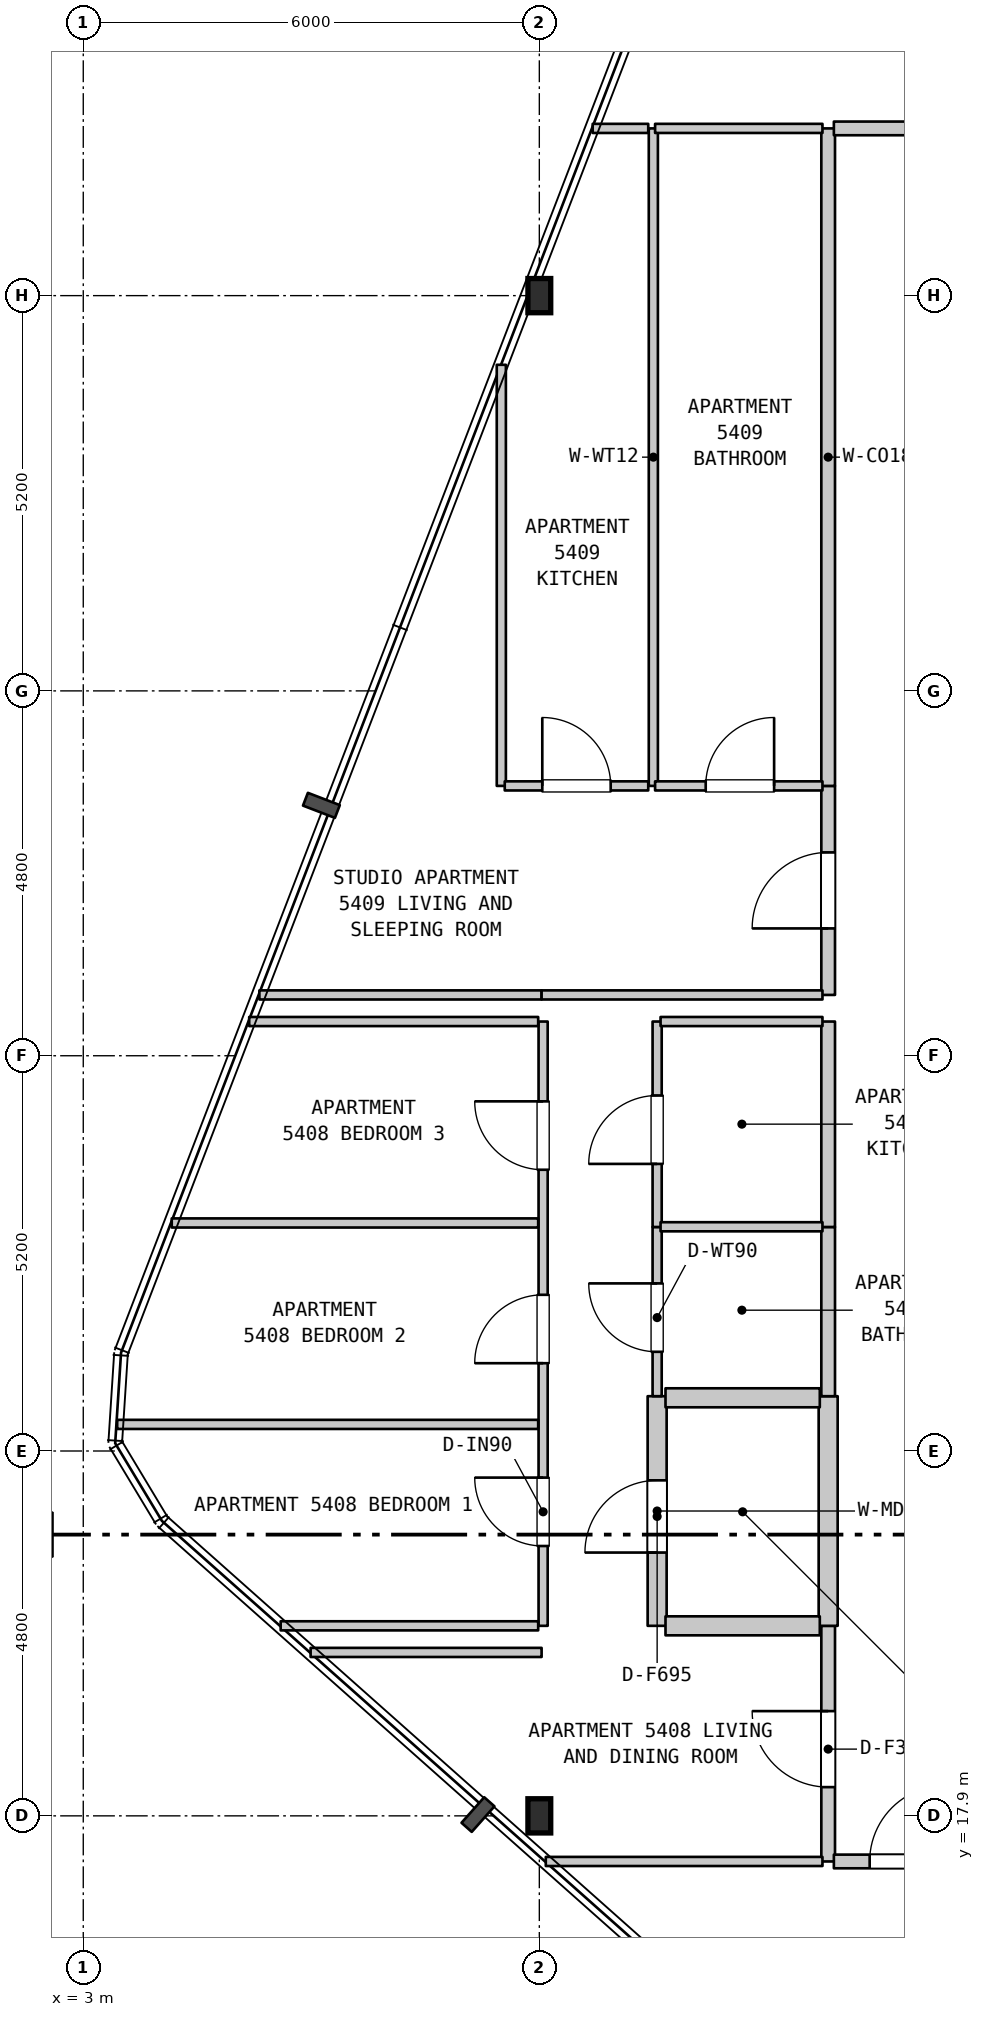
"""IFC4 building model, lengths in metres.
Left out: names, types, materials, properties, quantities, classifications, styles, units other than length and angle.
Written with IfcOpenShell. Run it as: python <this file> out.ifc"""

import sys

from ifc_helpers import new_model, si_unit, direction, frame, frame_2d, origin, origin_2d, place, context, subcontext, project, spatial, rectangle, i_section, extrude, element, fill, save


model = new_model("IFC4")
c1 = context("Model", 3, precision=1e-05, world=origin(), true_north=direction((0.0, 1.0)))
c2 = subcontext(c1, "Body", "Model", "MODEL_VIEW")
j1 = project(units=[si_unit("LENGTHUNIT", "METRE"), si_unit("PLANEANGLEUNIT", "RADIAN")], contexts=[c1])
p1 = place(None, origin())
s1 = spatial("IfcSite", under=j1, at=p1, CompositionType="ELEMENT")
p2 = place(p1, origin())
s2 = spatial("IfcBuilding", under=s1, at=p2, CompositionType="ELEMENT")
p3 = place(p2, frame((0.0, 0.0, 218.0)))
s3 = spatial("IfcBuildingStorey", under=s2, at=p3, CompositionType="ELEMENT", Elevation=218.0)
for number, where, z_axis, x_axis in (
    (1, (9.0, 17.9, 0.0), (0.0, 0.0, 1.0), (1.0, 0.0, 0.0)),
    (2, (9.0, 37.9, 0.0), (0.0, 0.0, 1.0), (1.0, 0.0, 0.0)),
):
    element("IfcColumn", number, at=place(p3, frame(where, z_axis=z_axis, x_axis=x_axis)), inside=s3, PredefinedType="COLUMN", context=c2, shape_type="SweptSolid", body=[
        extrude(i_section(OverallWidth=0.3, OverallDepth=0.45, WebThickness=0.014, FlangeThickness=0.026, FilletRadius=0.027, at=origin_2d()), origin(), (0.0, 0.0, 1.0), 4.8),
    ])
p4 = place(p3, frame((8.5, 31.45, 0.0), z_axis=(0.0, 0.0, 1.0), x_axis=(0.0, 1.0, 0.0)))
e3 = element("IfcWall", 3, at=p4, inside=s3, PredefinedType="PARTITIONING", context=c2, shape_type="SweptSolid", body=[
    extrude(rectangle(XDim=5.54, YDim=0.12, at=frame_2d((2.77, 0.0))), origin(), (0.0, 0.0, 1.0), 4.49),
])
p5 = place(p3, frame((9.05, 20.4, 0.0), z_axis=(0.0, 0.0, 1.0), x_axis=(0.0, 1.0, 0.0)))
e4 = element("IfcWall", 4, at=p5, inside=s3, PredefinedType="PARTITIONING", context=c2, shape_type="SweptSolid", body=[
    extrude(rectangle(XDim=7.95, YDim=0.12, at=frame_2d((3.975, 0.0))), origin(), (0.0, 0.0, 1.0), 3.89),
])
p6 = place(p5, frame((1.05, 0.0, 0.0)))
e5 = element("IfcOpeningElement", 5, at=p6, cuts=e4, PredefinedType="OPENING", context=c2, shape_type="SweptSolid", body=[
    extrude(rectangle(XDim=0.9, YDim=2.15, at=frame_2d((0.45, 1.075))), frame((0.0, 0.07, 0.0), z_axis=(0.0, -1.0, 0.0), x_axis=(1.0, 0.0, 0.0)), (0.0, 0.0, 1.0), 0.14),
])
p7 = place(p5, frame((3.455, 0.0, 0.0)))
e6 = element("IfcOpeningElement", 6, at=p7, cuts=e4, PredefinedType="OPENING", context=c2, shape_type="SweptSolid", body=[
    extrude(rectangle(XDim=0.9, YDim=2.15, at=frame_2d((0.45, 1.075))), frame((0.0, 0.07, 0.0), z_axis=(0.0, -1.0, 0.0), x_axis=(1.0, 0.0, 0.0)), (0.0, 0.0, 1.0), 0.14),
])
p8 = place(p5, frame((6.0, 0.0, 0.0)))
e7 = element("IfcOpeningElement", 7, at=p8, cuts=e4, PredefinedType="OPENING", context=c2, shape_type="SweptSolid", body=[
    extrude(rectangle(XDim=0.9, YDim=2.15, at=frame_2d((0.45, 1.075))), frame((0.0, 0.07, 0.0), z_axis=(0.0, -1.0, 0.0), x_axis=(1.0, 0.0, 0.0)), (0.0, 0.0, 1.0), 0.14),
])
p9 = place(p3, frame((10.5, 31.45, 0.0), z_axis=(0.0, 0.0, 1.0), x_axis=(0.0, 1.0, 0.0)))
e8 = element("IfcWall", 8, at=p9, inside=s3, PredefinedType="PARTITIONING", context=c2, shape_type="SweptSolid", body=[
    extrude(rectangle(XDim=8.65, YDim=0.12, at=frame_2d((4.325, 0.0))), origin(), (0.0, 0.0, 1.0), 4.49),
])
p10 = place(p3, frame((10.55, 20.4, 0.0), z_axis=(0.0, 0.0, 1.0), x_axis=(0.0, 1.0, 0.0)))
e9 = element("IfcWall", 9, at=p10, inside=s3, PredefinedType="STANDARD", context=c2, shape_type="SweptSolid", body=[
    extrude(rectangle(XDim=3.021, YDim=0.25, at=frame_2d((1.51, 0.0))), origin(), (0.0, 0.0, 1.0), 4.49),
])
p11 = place(p10, frame((0.964, 0.0, 0.0)))
e10 = element("IfcOpeningElement", 10, at=p11, cuts=e9, PredefinedType="OPENING", context=c2, shape_type="SweptSolid", body=[
    extrude(rectangle(XDim=0.95, YDim=2.15, at=frame_2d((0.475, 1.075))), frame((0.0, 0.135, 0.0), z_axis=(0.0, -1.0, 0.0), x_axis=(1.0, 0.0, 0.0)), (0.0, 0.0, 1.0), 0.27),
])
p12 = place(p3, frame((10.55, 23.421, 0.0), z_axis=(0.0, 0.0, 1.0), x_axis=(0.0, 1.0, 0.0)))
e11 = element("IfcWall", 11, at=p12, inside=s3, PredefinedType="PARTITIONING", context=c2, shape_type="SweptSolid", body=[
    extrude(rectangle(XDim=2.226, YDim=0.12, at=frame_2d((1.113, 0.0))), origin(), (0.0, 0.0, 1.0), 4.49),
])
p13 = place(p12, frame((0.584, 0.0, 0.0)))
e12 = element("IfcOpeningElement", 12, at=p13, cuts=e11, PredefinedType="OPENING", context=c2, shape_type="SweptSolid", body=[
    extrude(rectangle(XDim=0.9, YDim=2.1, at=frame_2d((0.45, 1.05))), frame((0.0, 0.07, 0.0), z_axis=(0.0, -1.0, 0.0), x_axis=(1.0, 0.0, 0.0)), (0.0, 0.0, 1.0), 0.14),
])
p14 = place(p3, frame((10.55, 25.647, 0.0), z_axis=(0.0, 0.0, 1.0), x_axis=(0.0, 1.0, 0.0)))
e13 = element("IfcWall", 13, at=p14, inside=s3, PredefinedType="PARTITIONING", context=c2, shape_type="SweptSolid", body=[
    extrude(rectangle(XDim=2.703, YDim=0.12, at=frame_2d((1.352, 0.0))), origin(), (0.0, 0.0, 1.0), 4.49),
])
p15 = place(p14, frame((0.83, 0.0, 0.0)))
e14 = element("IfcOpeningElement", 14, at=p15, cuts=e13, PredefinedType="OPENING", context=c2, shape_type="SweptSolid", body=[
    extrude(rectangle(XDim=0.9, YDim=2.15, at=frame_2d((0.45, 1.075))), frame((0.0, 0.07, 0.0), z_axis=(0.0, -1.0, 0.0), x_axis=(1.0, 0.0, 0.0)), (0.0, 0.0, 1.0), 0.14),
])
p16 = place(p3, frame((12.8, 17.3, 0.0), z_axis=(0.0, 0.0, 1.0), x_axis=(0.0, 1.0, 0.0)))
e15 = element("IfcWall", 15, at=p16, inside=s3, PredefinedType="STANDARD", context=c2, shape_type="SweptSolid", body=[
    extrude(rectangle(XDim=3.1, YDim=0.18, at=frame_2d((1.55, 0.0))), origin(), (0.0, 0.0, 1.0), 4.49),
])
p17 = place(p16, frame((0.978, 0.0, 0.0)))
e16 = element("IfcOpeningElement", 16, at=p17, cuts=e15, PredefinedType="OPENING", context=c2, shape_type="SweptSolid", body=[
    extrude(rectangle(XDim=1.0, YDim=2.15, at=frame_2d((0.5, 1.075))), frame((0.0, 0.1, 0.0), z_axis=(0.0, -1.0, 0.0), x_axis=(1.0, 0.0, 0.0)), (0.0, 0.0, 1.0), 0.2),
])
p18 = place(p3, frame((12.8, 20.4, 0.0), z_axis=(0.0, 0.0, 1.0), x_axis=(0.0, 1.0, 0.0)))
e17 = element("IfcWall", 17, at=p18, inside=s3, PredefinedType="STANDARD", context=c2, shape_type="SweptSolid", body=[
    extrude(rectangle(XDim=3.021, YDim=0.25, at=frame_2d((1.51, 0.0))), origin(), (0.0, 0.0, 1.0), 4.49),
])
p19 = place(p3, frame((12.8, 23.421, 0.0), z_axis=(0.0, 0.0, 1.0), x_axis=(0.0, 1.0, 0.0)))
e18 = element("IfcWall", 18, at=p19, inside=s3, PredefinedType="STANDARD", context=c2, shape_type="SweptSolid", body=[
    extrude(rectangle(XDim=2.226, YDim=0.18, at=frame_2d((1.113, 0.0))), origin(), (0.0, 0.0, 1.0), 4.49),
])
p20 = place(p3, frame((12.8, 25.647, 0.0), z_axis=(0.0, 0.0, 1.0), x_axis=(0.0, 1.0, 0.0)))
e19 = element("IfcWall", 19, at=p20, inside=s3, PredefinedType="STANDARD", context=c2, shape_type="SweptSolid", body=[
    extrude(rectangle(XDim=2.703, YDim=0.18, at=frame_2d((1.352, 0.0))), origin(), (0.0, 0.0, 1.0), 4.49),
])
p21 = place(p3, frame((12.8, 28.7, 0.0), z_axis=(0.0, 0.0, 1.0), x_axis=(0.0, 1.0, 0.0)))
e20 = element("IfcWall", 20, at=p21, inside=s3, PredefinedType="STANDARD", context=c2, shape_type="SweptSolid", body=[
    extrude(rectangle(XDim=2.75, YDim=0.18, at=frame_2d((1.375, 0.0))), origin(), (0.0, 0.0, 1.0), 4.49),
])
p22 = place(p21, frame((0.875, 0.0, 0.0)))
e21 = element("IfcOpeningElement", 21, at=p22, cuts=e20, PredefinedType="OPENING", context=c2, shape_type="SweptSolid", body=[
    extrude(rectangle(XDim=1.0, YDim=2.15, at=frame_2d((0.5, 1.075))), frame((0.0, 0.1, 0.0), z_axis=(0.0, -1.0, 0.0), x_axis=(1.0, 0.0, 0.0)), (0.0, 0.0, 1.0), 0.2),
])
p23 = place(p3, frame((12.8, 31.45, 0.0), z_axis=(0.0, 0.0, 1.0), x_axis=(0.0, 1.0, 0.0)))
e22 = element("IfcWall", 22, at=p23, inside=s3, PredefinedType="STANDARD", context=c2, shape_type="SweptSolid", body=[
    extrude(rectangle(XDim=8.65, YDim=0.18, at=frame_2d((4.325, 0.0))), origin(), (0.0, 0.0, 1.0), 4.49),
])
p24 = place(p3, frame((9.085, 17.3, 0.0), z_axis=(0.0, 0.0, 1.0), x_axis=(1.0, 0.0, 0.0)))
e23 = element("IfcWall", 23, at=p24, inside=s3, PredefinedType="PARTITIONING", context=c2, shape_type="SweptSolid", body=[
    extrude(rectangle(XDim=3.64, YDim=0.12, at=frame_2d((1.82, 0.0))), origin(), (0.0, 0.0, 1.0), 4.49),
])
p25 = place(p3, frame((12.875, 17.3, 0.0), z_axis=(0.0, 0.0, 1.0), x_axis=(1.0, 0.0, 0.0)))
e24 = element("IfcWall", 24, at=p25, inside=s3, PredefinedType="STANDARD", context=c2, shape_type="SweptSolid", body=[
    extrude(rectangle(XDim=3.28, YDim=0.18, at=frame_2d((1.64, 0.0))), origin(), (0.0, 0.0, 1.0), 4.49),
])
p26 = place(p25, frame((0.471, 0.0, 0.0)))
e25 = element("IfcOpeningElement", 25, at=p26, cuts=e24, PredefinedType="OPENING", context=c2, shape_type="SweptSolid", body=[
    extrude(rectangle(XDim=1.0, YDim=2.15, at=frame_2d((0.5, 1.075))), frame((0.0, 0.1, 0.0), z_axis=(0.0, -1.0, 0.0), x_axis=(1.0, 0.0, 0.0)), (0.0, 0.0, 1.0), 0.2),
])
p27 = place(p3, frame((5.991, 20.05, 0.0), z_axis=(0.0, 0.0, 1.0), x_axis=(1.0, 0.0, 0.0)))
e26 = element("IfcWall", 26, at=p27, inside=s3, PredefinedType="PARTITIONING", context=c2, shape_type="SweptSolid", body=[
    extrude(rectangle(XDim=3.039, YDim=0.12, at=frame_2d((1.52, 0.0))), origin(), (0.0, 0.0, 1.0), 4.49),
])
p28 = place(p3, frame((5.597, 20.4, 0.0), z_axis=(0.0, 0.0, 1.0), x_axis=(1.0, 0.0, 0.0)))
e27 = element("IfcWall", 27, at=p28, inside=s3, PredefinedType="PARTITIONING", context=c2, shape_type="SweptSolid", body=[
    extrude(rectangle(XDim=3.388, YDim=0.12, at=frame_2d((1.694, 0.0))), origin(), (0.0, 0.0, 1.0), 4.49),
])
p29 = place(p3, frame((10.66, 20.4, 0.0), z_axis=(0.0, 0.0, 1.0), x_axis=(1.0, 0.0, 0.0)))
e28 = element("IfcWall", 28, at=p29, inside=s3, PredefinedType="STANDARD", context=c2, shape_type="SweptSolid", body=[
    extrude(rectangle(XDim=2.03, YDim=0.25, at=frame_2d((1.015, 0.0))), origin(), (0.0, 0.0, 1.0), 4.49),
])
p30 = place(p3, frame((3.446, 23.05, 0.0), z_axis=(0.0, 0.0, 1.0), x_axis=(1.0, 0.0, 0.0)))
e29 = element("IfcWall", 29, at=p30, inside=s3, PredefinedType="PARTITIONING", context=c2, shape_type="SweptSolid", body=[
    extrude(rectangle(XDim=5.539, YDim=0.12, at=frame_2d((2.77, 0.0))), origin(), (0.0, 0.0, 1.0), 4.49),
])
p31 = place(p3, frame((10.66, 23.4, 0.0), z_axis=(0.0, 0.0, 1.0), x_axis=(1.0, 0.0, 0.0)))
e30 = element("IfcWall", 30, at=p31, inside=s3, PredefinedType="STANDARD", context=c2, shape_type="SweptSolid", body=[
    extrude(rectangle(XDim=2.03, YDim=0.25, at=frame_2d((1.015, 0.0))), origin(), (0.0, 0.0, 1.0), 4.49),
])
p32 = place(p3, frame((10.595, 25.65, 0.0), z_axis=(0.0, 0.0, 1.0), x_axis=(1.0, 0.0, 0.0)))
e31 = element("IfcWall", 31, at=p32, inside=s3, PredefinedType="PARTITIONING", context=c2, shape_type="SweptSolid", body=[
    extrude(rectangle(XDim=2.13, YDim=0.12, at=frame_2d((1.065, 0.0))), origin(), (0.0, 0.0, 1.0), 4.49),
])
p33 = place(p3, frame((4.164, 25.7, 0.0), z_axis=(0.0, 0.0, 1.0), x_axis=(1.0, 0.0, 0.0)))
e32 = element("IfcWall", 32, at=p33, inside=s3, PredefinedType="PARTITIONING", context=c2, shape_type="SweptSolid", body=[
    extrude(rectangle(XDim=4.821, YDim=0.12, at=frame_2d((2.411, 0.0))), origin(), (0.0, 0.0, 1.0), 4.49),
])
p34 = place(p3, frame((5.183, 28.35, 0.0), z_axis=(0.0, 0.0, 1.0), x_axis=(1.0, 0.0, 0.0)))
e33 = element("IfcWall", 33, at=p34, inside=s3, PredefinedType="PARTITIONING", context=c2, shape_type="SweptSolid", body=[
    extrude(rectangle(XDim=3.802, YDim=0.12, at=frame_2d((1.901, 0.0))), origin(), (0.0, 0.0, 1.0), 4.49),
])
p35 = place(p3, frame((10.595, 28.35, 0.0), z_axis=(0.0, 0.0, 1.0), x_axis=(1.0, 0.0, 0.0)))
e34 = element("IfcWall", 34, at=p35, inside=s3, PredefinedType="PARTITIONING", context=c2, shape_type="SweptSolid", body=[
    extrude(rectangle(XDim=2.13, YDim=0.12, at=frame_2d((1.065, 0.0))), origin(), (0.0, 0.0, 1.0), 4.49),
])
p36 = place(p3, frame((5.317, 28.7, 0.0), z_axis=(0.0, 0.0, 1.0), x_axis=(1.0, 0.0, 0.0)))
e35 = element("IfcWall", 35, at=p36, inside=s3, PredefinedType="PARTITIONING", context=c2, shape_type="SweptSolid", body=[
    extrude(rectangle(XDim=3.713, YDim=0.12, at=frame_2d((1.856, 0.0))), origin(), (0.0, 0.0, 1.0), 4.49),
])
p37 = place(p3, frame((9.03, 28.7, 0.0), z_axis=(0.0, 0.0, 1.0), x_axis=(1.0, 0.0, 0.0)))
e36 = element("IfcWall", 36, at=p37, inside=s3, PredefinedType="PARTITIONING", context=c2, shape_type="SweptSolid", body=[
    extrude(rectangle(XDim=3.695, YDim=0.12, at=frame_2d((1.848, 0.0))), origin(), (0.0, 0.0, 1.0), 4.49),
])
p38 = place(p3, frame((8.545, 31.45, 0.0), z_axis=(0.0, 0.0, 1.0), x_axis=(1.0, 0.0, 0.0)))
e37 = element("IfcWall", 37, at=p38, inside=s3, PredefinedType="PARTITIONING", context=c2, shape_type="SweptSolid", body=[
    extrude(rectangle(XDim=1.888, YDim=0.12, at=frame_2d((0.944, 0.0))), origin(), (0.0, 0.0, 1.0), 4.49),
])
p39 = place(p38, frame((0.494, 0.0, 0.0)))
e38 = element("IfcOpeningElement", 38, at=p39, cuts=e37, PredefinedType="OPENING", context=c2, shape_type="SweptSolid", body=[
    extrude(rectangle(XDim=0.9, YDim=2.15, at=frame_2d((0.45, 1.075))), frame((0.0, 0.07, 0.0), z_axis=(0.0, -1.0, 0.0), x_axis=(1.0, 0.0, 0.0)), (0.0, 0.0, 1.0), 0.14),
])
p40 = place(p3, frame((10.523, 31.45, 0.0), z_axis=(0.0, 0.0, 1.0), x_axis=(1.0, 0.0, 0.0)))
e39 = element("IfcWall", 39, at=p40, inside=s3, PredefinedType="PARTITIONING", context=c2, shape_type="SweptSolid", body=[
    extrude(rectangle(XDim=2.202, YDim=0.12, at=frame_2d((1.101, 0.0))), origin(), (0.0, 0.0, 1.0), 4.49),
])
p41 = place(p40, frame((0.666, 0.0, 0.0)))
e40 = element("IfcOpeningElement", 40, at=p41, cuts=e39, PredefinedType="OPENING", context=c2, shape_type="SweptSolid", body=[
    extrude(rectangle(XDim=0.9, YDim=2.1, at=frame_2d((0.45, 1.05))), frame((0.0, 0.07, 0.0), z_axis=(0.0, -1.0, 0.0), x_axis=(1.0, 0.0, 0.0)), (0.0, 0.0, 1.0), 0.14),
])
p42 = place(p3, frame((9.702, 40.1, 0.0), z_axis=(0.0, 0.0, 1.0), x_axis=(1.0, 0.0, 0.0)))
e41 = element("IfcWall", 41, at=p42, inside=s3, PredefinedType="PARTITIONING", context=c2, shape_type="SweptSolid", body=[
    extrude(rectangle(XDim=0.731, YDim=0.12, at=frame_2d((0.366, 0.0))), origin(), (0.0, 0.0, 1.0), 4.49),
])
p43 = place(p3, frame((10.523, 40.1, 0.0), z_axis=(0.0, 0.0, 1.0), x_axis=(1.0, 0.0, 0.0)))
e42 = element("IfcWall", 42, at=p43, inside=s3, PredefinedType="PARTITIONING", context=c2, shape_type="SweptSolid", body=[
    extrude(rectangle(XDim=2.202, YDim=0.12, at=frame_2d((1.101, 0.0))), origin(), (0.0, 0.0, 1.0), 4.49),
])
p44 = place(p3, frame((12.875, 40.1, 0.0), z_axis=(0.0, 0.0, 1.0), x_axis=(1.0, 0.0, 0.0)))
e43 = element("IfcWall", 43, at=p44, inside=s3, PredefinedType="STANDARD", context=c2, shape_type="SweptSolid", body=[
    extrude(rectangle(XDim=4.61, YDim=0.18, at=frame_2d((2.305, 0.0))), origin(), (0.0, 0.0, 1.0), 4.49),
])
p45 = place(p44, frame((1.72, 0.0, 0.0)))
e44 = element("IfcOpeningElement", 44, at=p45, cuts=e43, PredefinedType="OPENING", context=c2, shape_type="SweptSolid", body=[
    extrude(rectangle(XDim=1.0, YDim=2.15, at=frame_2d((0.5, 1.075))), frame((0.0, 0.1, 0.0), z_axis=(0.0, -1.0, 0.0), x_axis=(1.0, 0.0, 0.0)), (0.0, 0.0, 1.0), 0.2),
])
p46 = place(p6, origin())
e45 = element("IfcDoor", 45, at=p46, inside=s3, OperationType="SINGLE_SWING_RIGHT", PredefinedType="DOOR", context=c2, shape_type="SweptSolid", body=[
    extrude(rectangle(XDim=0.9, YDim=2.15, at=frame_2d((0.45, 1.075))), frame((0.0, 0.025, 0.0), z_axis=(0.0, -1.0, 0.0), x_axis=(1.0, 0.0, 0.0)), (0.0, 0.0, 1.0), 0.05),
])
fill(e5, e45)
p47 = place(p7, origin())
e46 = element("IfcDoor", 46, at=p47, inside=s3, OperationType="SINGLE_SWING_LEFT", PredefinedType="DOOR", context=c2, shape_type="SweptSolid", body=[
    extrude(rectangle(XDim=0.9, YDim=2.15, at=frame_2d((0.45, 1.075))), frame((0.0, 0.025, 0.0), z_axis=(0.0, -1.0, 0.0), x_axis=(1.0, 0.0, 0.0)), (0.0, 0.0, 1.0), 0.05),
])
fill(e6, e46)
p48 = place(p8, origin())
e47 = element("IfcDoor", 47, at=p48, inside=s3, OperationType="SINGLE_SWING_RIGHT", PredefinedType="DOOR", context=c2, shape_type="SweptSolid", body=[
    extrude(rectangle(XDim=0.9, YDim=2.15, at=frame_2d((0.45, 1.075))), frame((0.0, 0.025, 0.0), z_axis=(0.0, -1.0, 0.0), x_axis=(1.0, 0.0, 0.0)), (0.0, 0.0, 1.0), 0.05),
])
fill(e7, e47)
p49 = place(p11, origin())
e48 = element("IfcDoor", 48, at=p49, inside=s3, OperationType="SINGLE_SWING_LEFT", PredefinedType="DOOR", context=c2, shape_type="SweptSolid", body=[
    extrude(rectangle(XDim=0.95, YDim=2.15, at=frame_2d((0.475, 1.075))), frame((0.0, 0.025, 0.0), z_axis=(0.0, -1.0, 0.0), x_axis=(1.0, 0.0, 0.0)), (0.0, 0.0, 1.0), 0.05),
])
fill(e10, e48)
p50 = place(p13, origin())
e49 = element("IfcDoor", 49, at=p50, inside=s3, OperationType="SINGLE_SWING_RIGHT", PredefinedType="DOOR", context=c2, shape_type="SweptSolid", body=[
    extrude(rectangle(XDim=0.9, YDim=2.1, at=frame_2d((0.45, 1.05))), frame((0.0, 0.025, 0.0), z_axis=(0.0, -1.0, 0.0), x_axis=(1.0, 0.0, 0.0)), (0.0, 0.0, 1.0), 0.05),
])
fill(e12, e49)
p51 = place(p15, origin())
e50 = element("IfcDoor", 50, at=p51, inside=s3, OperationType="SINGLE_SWING_LEFT", PredefinedType="DOOR", context=c2, shape_type="SweptSolid", body=[
    extrude(rectangle(XDim=0.9, YDim=2.15, at=frame_2d((0.45, 1.075))), frame((0.0, 0.025, 0.0), z_axis=(0.0, -1.0, 0.0), x_axis=(1.0, 0.0, 0.0)), (0.0, 0.0, 1.0), 0.05),
])
fill(e14, e50)
p52 = place(p17, origin())
e51 = element("IfcDoor", 51, at=p52, inside=s3, OperationType="SINGLE_SWING_RIGHT", PredefinedType="DOOR", context=c2, shape_type="SweptSolid", body=[
    extrude(rectangle(XDim=1.0, YDim=2.15, at=frame_2d((0.5, 1.075))), frame((0.0, 0.025, 0.0), z_axis=(0.0, -1.0, 0.0), x_axis=(1.0, 0.0, 0.0)), (0.0, 0.0, 1.0), 0.05),
])
fill(e16, e51)
p53 = place(p22, origin())
e52 = element("IfcDoor", 52, at=p53, inside=s3, OperationType="SINGLE_SWING_LEFT", PredefinedType="DOOR", context=c2, shape_type="SweptSolid", body=[
    extrude(rectangle(XDim=1.0, YDim=2.15, at=frame_2d((0.5, 1.075))), frame((0.0, 0.025, 0.0), z_axis=(0.0, -1.0, 0.0), x_axis=(1.0, 0.0, 0.0)), (0.0, 0.0, 1.0), 0.05),
])
fill(e21, e52)
p54 = place(p26, origin())
e53 = element("IfcDoor", 53, at=p54, inside=s3, OperationType="SINGLE_SWING_RIGHT", PredefinedType="DOOR", context=c2, shape_type="SweptSolid", body=[
    extrude(rectangle(XDim=1.0, YDim=2.15, at=frame_2d((0.5, 1.075))), frame((0.0, 0.025, 0.0), z_axis=(0.0, -1.0, 0.0), x_axis=(1.0, 0.0, 0.0)), (0.0, 0.0, 1.0), 0.05),
])
fill(e25, e53)
p55 = place(p39, origin())
e54 = element("IfcDoor", 54, at=p55, inside=s3, OperationType="SINGLE_SWING_LEFT", PredefinedType="DOOR", context=c2, shape_type="SweptSolid", body=[
    extrude(rectangle(XDim=0.9, YDim=2.15, at=frame_2d((0.45, 1.075))), frame((0.0, 0.025, 0.0), z_axis=(0.0, -1.0, 0.0), x_axis=(1.0, 0.0, 0.0)), (0.0, 0.0, 1.0), 0.05),
])
fill(e38, e54)
p56 = place(p41, origin())
e55 = element("IfcDoor", 55, at=p56, inside=s3, OperationType="SINGLE_SWING_RIGHT", PredefinedType="DOOR", context=c2, shape_type="SweptSolid", body=[
    extrude(rectangle(XDim=0.9, YDim=2.1, at=frame_2d((0.45, 1.05))), frame((0.0, 0.025, 0.0), z_axis=(0.0, -1.0, 0.0), x_axis=(1.0, 0.0, 0.0)), (0.0, 0.0, 1.0), 0.05),
])
fill(e40, e55)
save(model, sys.argv[1])
